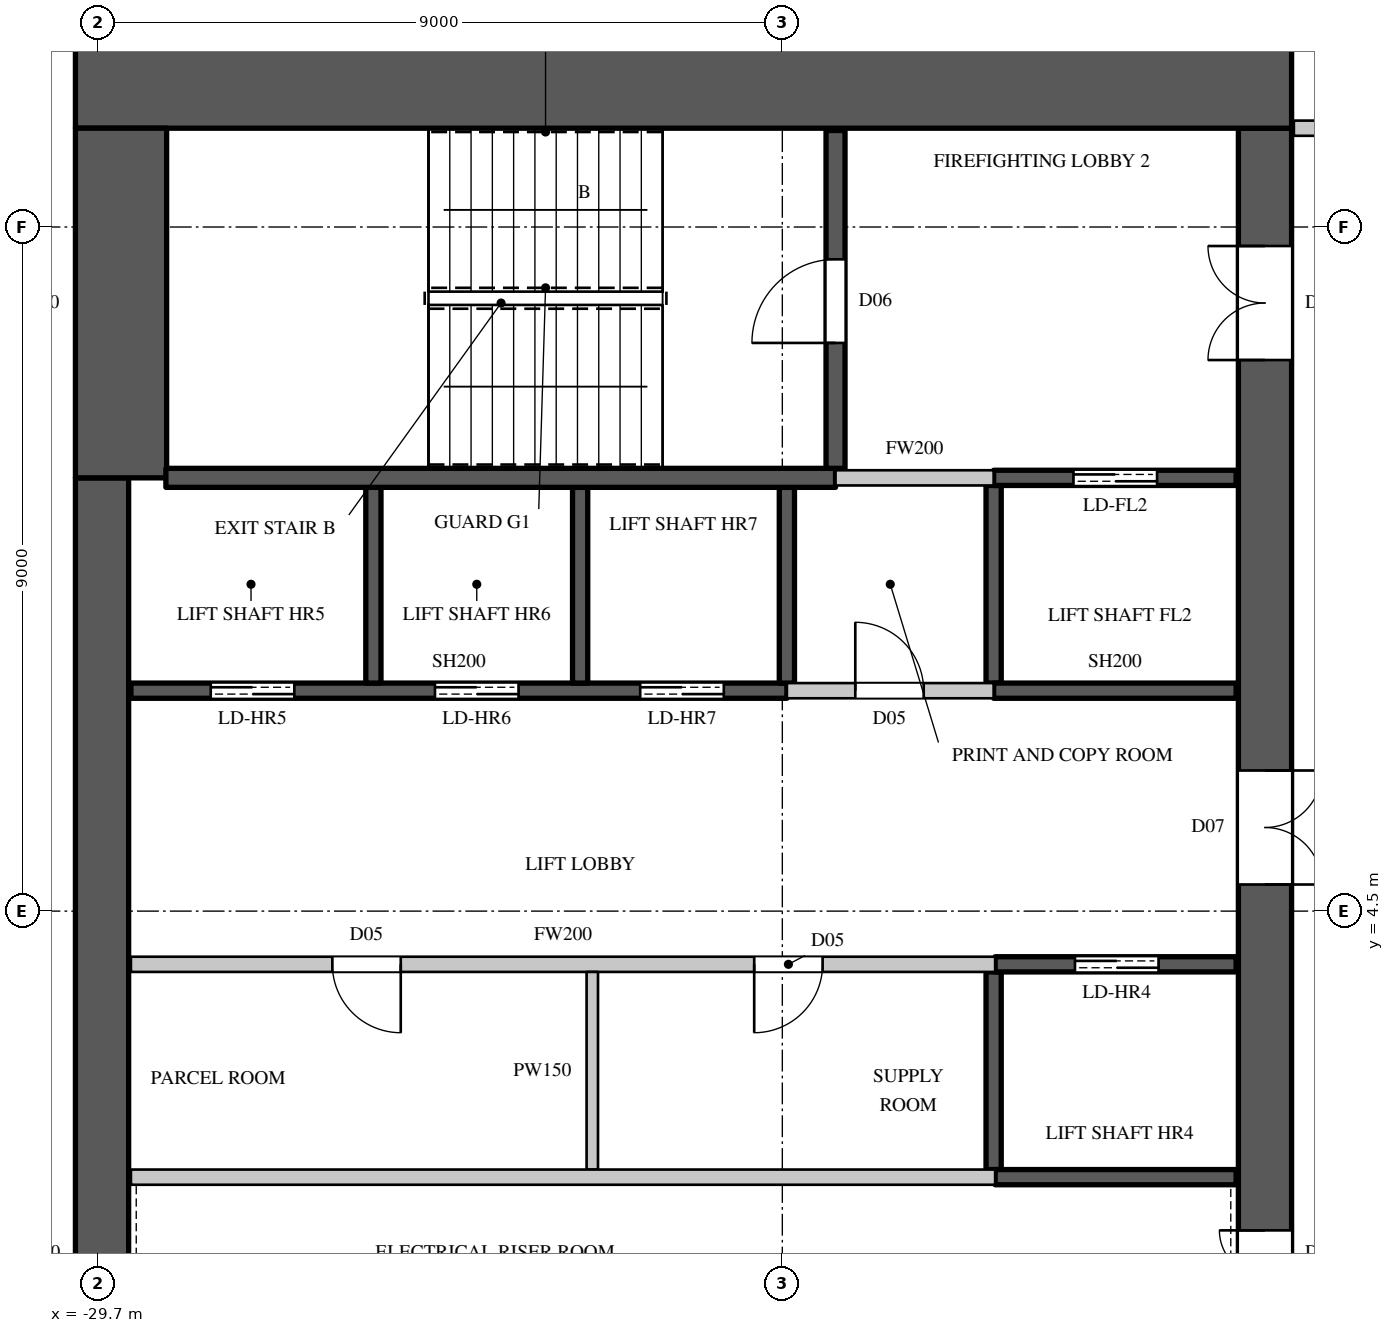
"""IFC4 building model, lengths in metres.
Left out: names, types, materials, properties, quantities, classifications, styles, units other than length and angle.
Written with IfcOpenShell. Run it as: python <this file> out.ifc"""

import sys

from ifc_helpers import new_model, si_unit, direction, frame, frame_2d, origin, place, context, subcontext, project, spatial, rectangle, extrude, element, fill, save


model = new_model("IFC4")
c1 = context("Model", 3, precision=1e-05, world=origin(), true_north=direction((0.0, 1.0)))
c2 = subcontext(c1, "Body", "Model", "MODEL_VIEW")
j1 = project(units=[si_unit("LENGTHUNIT", "METRE"), si_unit("PLANEANGLEUNIT", "RADIAN")], contexts=[c1])
p1 = place(None, origin())
s1 = spatial("IfcSite", under=j1, at=p1, CompositionType="ELEMENT")
p2 = place(p1, origin())
s2 = spatial("IfcBuilding", under=s1, at=p2, CompositionType="ELEMENT")
p3 = place(p2, frame((0.0, 0.0, 243.4)))
s3 = spatial("IfcBuildingStorey", under=s2, at=p3, CompositionType="ELEMENT", Elevation=243.4)
p4 = place(p3, frame((-30.0, 15.4, 0.0), z_axis=(0.0, 0.0, 1.0), x_axis=(1.0, 0.0, 0.0)))
e1 = element("IfcWall", 1, at=p4, inside=s3, PredefinedType="SHEAR", context=c2, shape_type="SweptSolid", body=[
    extrude(rectangle(XDim=16.0, YDim=1.2, at=frame_2d((8.0, 0.0))), origin(), (0.0, 0.0, 1.0), 4.1),
])
p5 = place(p3, frame((-14.35, -14.8, 0.0), z_axis=(0.0, 0.0, 1.0), x_axis=(0.0, 1.0, 0.0)))
e2 = element("IfcWall", 2, at=p5, inside=s3, PredefinedType="SHEAR", context=c2, shape_type="SweptSolid", body=[
    extrude(rectangle(XDim=29.6, YDim=0.7, at=frame_2d((14.8, 0.0))), origin(), (0.0, 0.0, 1.0), 4.1),
])
p6 = place(p5, frame((1.55, 0.0, 0.0)))
e3 = element("IfcOpeningElement", 3, at=p6, cuts=e2, PredefinedType="OPENING", context=c2, shape_type="SweptSolid", body=[
    extrude(rectangle(XDim=1.5, YDim=2.4, at=frame_2d((0.75, 1.2))), frame((0.0, 0.36, 0.0), z_axis=(0.0, -1.0, 0.0), x_axis=(1.0, 0.0, 0.0)), (0.0, 0.0, 1.0), 0.72),
])
p7 = place(p5, frame((26.55, 0.0, 0.0)))
e4 = element("IfcOpeningElement", 4, at=p7, cuts=e2, PredefinedType="OPENING", context=c2, shape_type="SweptSolid", body=[
    extrude(rectangle(XDim=1.5, YDim=2.4, at=frame_2d((0.75, 1.2))), frame((0.0, 0.36, 0.0), z_axis=(0.0, -1.0, 0.0), x_axis=(1.0, 0.0, 0.0)), (0.0, 0.0, 1.0), 0.72),
])
p8 = place(p5, frame((8.45, 0.0, 0.0)))
e5 = element("IfcOpeningElement", 5, at=p8, cuts=e2, PredefinedType="OPENING", context=c2, shape_type="SweptSolid", body=[
    extrude(rectangle(XDim=1.5, YDim=2.4, at=frame_2d((0.75, 1.2))), frame((0.0, 0.36, 0.0), z_axis=(0.0, -1.0, 0.0), x_axis=(1.0, 0.0, 0.0)), (0.0, 0.0, 1.0), 0.72),
])
p9 = place(p5, frame((19.65, 0.0, 0.0)))
e6 = element("IfcOpeningElement", 6, at=p9, cuts=e2, PredefinedType="OPENING", context=c2, shape_type="SweptSolid", body=[
    extrude(rectangle(XDim=1.5, YDim=2.4, at=frame_2d((0.75, 1.2))), frame((0.0, 0.36, 0.0), z_axis=(0.0, -1.0, 0.0), x_axis=(1.0, 0.0, 0.0)), (0.0, 0.0, 1.0), 0.72),
])
p10 = place(p5, frame((14.5, 0.0, 0.0)))
e7 = element("IfcOpeningElement", 7, at=p10, cuts=e2, PredefinedType="OPENING", context=c2, shape_type="SweptSolid", body=[
    extrude(rectangle(XDim=0.6, YDim=2.0, at=frame_2d((0.3, 1.0))), frame((0.0, 0.36, 0.0), z_axis=(0.0, -1.0, 0.0), x_axis=(1.0, 0.0, 0.0)), (0.0, 0.0, 1.0), 0.72),
])
p11 = place(p3, frame((-29.65, -10.2, 0.0), z_axis=(0.0, 0.0, 1.0), x_axis=(0.0, 1.0, 0.0)))
e8 = element("IfcWall", 8, at=p11, inside=s3, PredefinedType="SHEAR", context=c2, shape_type="SweptSolid", body=[
    extrude(rectangle(XDim=20.4, YDim=0.7, at=frame_2d((10.2, 0.0))), origin(), (0.0, 0.0, 1.0), 4.1),
])
p12 = place(p3, frame((-29.4, 10.2, 0.0), z_axis=(0.0, 0.0, 1.0), x_axis=(0.0, 1.0, 0.0)))
e9 = element("IfcWall", 9, at=p12, inside=s3, PredefinedType="SHEAR", context=c2, shape_type="SweptSolid", body=[
    extrude(rectangle(XDim=4.6, YDim=1.2, at=frame_2d((2.3, 0.0))), origin(), (0.0, 0.0, 1.0), 4.1),
])
p13 = place(p3, frame((-29.27, 3.8, 0.0), z_axis=(0.0, 0.0, 1.0), x_axis=(1.0, 0.0, 0.0)))
e10 = element("IfcWall", 10, at=p13, inside=s3, PredefinedType="PARTITIONING", context=c2, shape_type="SweptSolid", body=[
    extrude(rectangle(XDim=11.37, YDim=0.2, at=frame_2d((5.685, 0.0))), origin(), (0.0, 0.0, 1.0), 3.8),
])
p14 = place(p13, frame((2.65, 0.0, 0.0)))
e11 = element("IfcOpeningElement", 11, at=p14, cuts=e10, PredefinedType="OPENING", context=c2, shape_type="SweptSolid", body=[
    extrude(rectangle(XDim=0.9, YDim=2.2, at=frame_2d((0.45, 1.1))), frame((0.0, 0.11, 0.0), z_axis=(0.0, -1.0, 0.0), x_axis=(1.0, 0.0, 0.0)), (0.0, 0.0, 1.0), 0.22),
])
p15 = place(p13, frame((8.2, 0.0, 0.0)))
e12 = element("IfcOpeningElement", 12, at=p15, cuts=e10, PredefinedType="OPENING", context=c2, shape_type="SweptSolid", body=[
    extrude(rectangle(XDim=0.9, YDim=2.2, at=frame_2d((0.45, 1.1))), frame((0.0, 0.11, 0.0), z_axis=(0.0, -1.0, 0.0), x_axis=(1.0, 0.0, 0.0)), (0.0, 0.0, 1.0), 0.22),
])
p16 = place(p3, frame((-20.64, 7.4, 0.0), z_axis=(0.0, 0.0, 1.0), x_axis=(1.0, 0.0, 0.0)))
e13 = element("IfcWall", 13, at=p16, inside=s3, PredefinedType="PARTITIONING", context=c2, shape_type="SweptSolid", body=[
    extrude(rectangle(XDim=2.72, YDim=0.2, at=frame_2d((1.36, 0.0))), origin(), (0.0, 0.0, 1.0), 3.8),
])
p17 = place(p16, frame((0.9, 0.0, 0.0)))
e14 = element("IfcOpeningElement", 14, at=p17, cuts=e13, PredefinedType="OPENING", context=c2, shape_type="SweptSolid", body=[
    extrude(rectangle(XDim=0.9, YDim=2.2, at=frame_2d((0.45, 1.1))), frame((0.0, 0.11, 0.0), z_axis=(0.0, -1.0, 0.0), x_axis=(1.0, 0.0, 0.0)), (0.0, 0.0, 1.0), 0.22),
])
p18 = place(p3, frame((-20.0, 10.2, 0.0), z_axis=(0.0, 0.0, 1.0), x_axis=(1.0, 0.0, 0.0)))
e15 = element("IfcWall", 15, at=p18, inside=s3, PredefinedType="PARTITIONING", context=c2, shape_type="SweptSolid", body=[
    extrude(rectangle(XDim=2.08, YDim=0.2, at=frame_2d((1.04, 0.0))), origin(), (0.0, 0.0, 1.0), 3.8),
])
p19 = place(p3, frame((-13.97, 14.8, 0.0), z_axis=(0.0, 0.0, 1.0), x_axis=(1.0, 0.0, 0.0)))
e16 = element("IfcWall", 16, at=p19, inside=s3, PredefinedType="PARTITIONING", context=c2, shape_type="SweptSolid", body=[
    extrude(rectangle(XDim=2.87, YDim=0.2, at=frame_2d((1.435, 0.0))), origin(), (0.0, 0.0, 1.0), 3.8),
])
p20 = place(p3, frame((-23.2, 1.1, 0.0), z_axis=(0.0, 0.0, 1.0), x_axis=(0.0, 1.0, 0.0)))
e17 = element("IfcWall", 17, at=p20, inside=s3, PredefinedType="PARTITIONING", context=c2, shape_type="SweptSolid", body=[
    extrude(rectangle(XDim=2.6, YDim=0.15, at=frame_2d((1.3, 0.0))), origin(), (0.0, 0.0, 1.0), 3.8),
])
p21 = place(p3, frame((-29.27, 1.0, 0.0), z_axis=(0.0, 0.0, 1.0), x_axis=(1.0, 0.0, 0.0)))
e18 = element("IfcWall", 18, at=p21, inside=s3, PredefinedType="PARTITIONING", context=c2, shape_type="SweptSolid", body=[
    extrude(rectangle(XDim=11.37, YDim=0.2, at=frame_2d((5.685, 0.0))), origin(), (0.0, 0.0, 1.0), 3.8),
])
p22 = place(p3, frame((-29.27, 7.4, 0.0), z_axis=(0.0, 0.0, 1.0), x_axis=(1.0, 0.0, 0.0)))
e19 = element("IfcWall", 19, at=p22, inside=s3, PredefinedType="SHEAR", context=c2, shape_type="SweptSolid", body=[
    extrude(rectangle(XDim=8.63, YDim=0.2, at=frame_2d((4.315, 0.0))), origin(), (0.0, 0.0, 1.0), 3.8),
])
p23 = place(p22, frame((1.05, 0.0, 0.0)))
e20 = element("IfcOpeningElement", 20, at=p23, cuts=e19, PredefinedType="OPENING", context=c2, shape_type="SweptSolid", body=[
    extrude(rectangle(XDim=1.1, YDim=2.2, at=frame_2d((0.55, 1.1))), frame((0.0, 0.11, 0.0), z_axis=(0.0, -1.0, 0.0), x_axis=(1.0, 0.0, 0.0)), (0.0, 0.0, 1.0), 0.22),
])
p24 = place(p22, frame((4.0, 0.0, 0.0)))
e21 = element("IfcOpeningElement", 21, at=p24, cuts=e19, PredefinedType="OPENING", context=c2, shape_type="SweptSolid", body=[
    extrude(rectangle(XDim=1.1, YDim=2.2, at=frame_2d((0.55, 1.1))), frame((0.0, 0.11, 0.0), z_axis=(0.0, -1.0, 0.0), x_axis=(1.0, 0.0, 0.0)), (0.0, 0.0, 1.0), 0.22),
])
p25 = place(p22, frame((6.7, 0.0, 0.0)))
e22 = element("IfcOpeningElement", 22, at=p25, cuts=e19, PredefinedType="OPENING", context=c2, shape_type="SweptSolid", body=[
    extrude(rectangle(XDim=1.1, YDim=2.2, at=frame_2d((0.55, 1.1))), frame((0.0, 0.11, 0.0), z_axis=(0.0, -1.0, 0.0), x_axis=(1.0, 0.0, 0.0)), (0.0, 0.0, 1.0), 0.22),
])
for number, where, z_axis, x_axis in (
    (23, (-26.08, 7.5, 0.0), (0.0, 0.0, 1.0), (0.0, 1.0, 0.0)),
    (24, (-23.36, 7.5, 0.0), (0.0, 0.0, 1.0), (0.0, 1.0, 0.0)),
):
    element("IfcWall", number, at=place(p3, frame(where, z_axis=z_axis, x_axis=x_axis)), inside=s3, PredefinedType="SHEAR", context=c2, shape_type="SweptSolid", body=[
        extrude(rectangle(XDim=2.575, YDim=0.2, at=frame_2d((1.288, 0.0))), origin(), (0.0, 0.0, 1.0), 4.1),
    ])
p26 = place(p3, frame((-20.64, 7.5, 0.0), z_axis=(0.0, 0.0, 1.0), x_axis=(0.0, 1.0, 0.0)))
e25 = element("IfcWall", 25, at=p26, inside=s3, PredefinedType="SHEAR", context=c2, shape_type="SweptSolid", body=[
    extrude(rectangle(XDim=2.575, YDim=0.2, at=frame_2d((1.288, 0.0))), origin(), (0.0, 0.0, 1.0), 3.8),
])
p27 = place(p3, frame((-17.92, 1.1, 0.0), z_axis=(0.0, 0.0, 1.0), x_axis=(0.0, 1.0, 0.0)))
e26 = element("IfcWall", 26, at=p27, inside=s3, PredefinedType="SHEAR", context=c2, shape_type="SweptSolid", body=[
    extrude(rectangle(XDim=2.6, YDim=0.2, at=frame_2d((1.3, 0.0))), origin(), (0.0, 0.0, 1.0), 3.8),
])
p28 = place(p3, frame((-17.9, 1.0, 0.0), z_axis=(0.0, 0.0, 1.0), x_axis=(1.0, 0.0, 0.0)))
e27 = element("IfcWall", 27, at=p28, inside=s3, PredefinedType="SHEAR", context=c2, shape_type="SweptSolid", body=[
    extrude(rectangle(XDim=3.17, YDim=0.2, at=frame_2d((1.585, 0.0))), origin(), (0.0, 0.0, 1.0), 3.8),
])
p29 = place(p3, frame((-17.9, 3.8, 0.0), z_axis=(0.0, 0.0, 1.0), x_axis=(1.0, 0.0, 0.0)))
e28 = element("IfcWall", 28, at=p29, inside=s3, PredefinedType="SHEAR", context=c2, shape_type="SweptSolid", body=[
    extrude(rectangle(XDim=3.17, YDim=0.2, at=frame_2d((1.585, 0.0))), origin(), (0.0, 0.0, 1.0), 3.8),
])
p30 = place(p29, frame((1.05, 0.0, 0.0)))
e29 = element("IfcOpeningElement", 29, at=p30, cuts=e28, PredefinedType="OPENING", context=c2, shape_type="SweptSolid", body=[
    extrude(rectangle(XDim=1.1, YDim=2.2, at=frame_2d((0.55, 1.1))), frame((0.0, 0.11, 0.0), z_axis=(0.0, -1.0, 0.0), x_axis=(1.0, 0.0, 0.0)), (0.0, 0.0, 1.0), 0.22),
])
p31 = place(p3, frame((-17.92, 7.5, 0.0), z_axis=(0.0, 0.0, 1.0), x_axis=(0.0, 1.0, 0.0)))
e30 = element("IfcWall", 30, at=p31, inside=s3, PredefinedType="SHEAR", context=c2, shape_type="SweptSolid", body=[
    extrude(rectangle(XDim=2.6, YDim=0.2, at=frame_2d((1.3, 0.0))), origin(), (0.0, 0.0, 1.0), 3.8),
])
p32 = place(p3, frame((-17.92, 7.4, 0.0), z_axis=(0.0, 0.0, 1.0), x_axis=(1.0, 0.0, 0.0)))
e31 = element("IfcWall", 31, at=p32, inside=s3, PredefinedType="SHEAR", context=c2, shape_type="SweptSolid", body=[
    extrude(rectangle(XDim=3.19, YDim=0.2, at=frame_2d((1.595, 0.0))), origin(), (0.0, 0.0, 1.0), 3.8),
])
p33 = place(p3, frame((-17.92, 10.2, 0.0), z_axis=(0.0, 0.0, 1.0), x_axis=(1.0, 0.0, 0.0)))
e32 = element("IfcWall", 32, at=p33, inside=s3, PredefinedType="SHEAR", context=c2, shape_type="SweptSolid", body=[
    extrude(rectangle(XDim=3.19, YDim=0.2, at=frame_2d((1.595, 0.0))), origin(), (0.0, 0.0, 1.0), 3.8),
])
p34 = place(p33, frame((1.05, 0.0, 0.0)))
e33 = element("IfcOpeningElement", 33, at=p34, cuts=e32, PredefinedType="OPENING", context=c2, shape_type="SweptSolid", body=[
    extrude(rectangle(XDim=1.1, YDim=2.2, at=frame_2d((0.55, 1.1))), frame((0.0, 0.11, 0.0), z_axis=(0.0, -1.0, 0.0), x_axis=(1.0, 0.0, 0.0)), (0.0, 0.0, 1.0), 0.22),
])
p35 = place(p3, frame((-28.81, 10.2, 0.0), z_axis=(0.0, 0.0, 1.0), x_axis=(1.0, 0.0, 0.0)))
e34 = element("IfcWall", 34, at=p35, inside=s3, PredefinedType="SHEAR", context=c2, shape_type="SweptSolid", body=[
    extrude(rectangle(XDim=8.81, YDim=0.25, at=frame_2d((4.405, 0.0))), origin(), (0.0, 0.0, 1.0), 3.8),
])
p36 = place(p3, frame((-20.0, 10.325, 0.0), z_axis=(0.0, 0.0, 1.0), x_axis=(0.0, 1.0, 0.0)))
e35 = element("IfcWall", 35, at=p36, inside=s3, PredefinedType="SHEAR", context=c2, shape_type="SweptSolid", body=[
    extrude(rectangle(XDim=4.445, YDim=0.25, at=frame_2d((2.223, 0.0))), origin(), (0.0, 0.0, 1.0), 3.8),
])
p37 = place(p36, frame((1.65, 0.0, 0.0)))
e36 = element("IfcOpeningElement", 36, at=p37, cuts=e35, PredefinedType="OPENING", context=c2, shape_type="SweptSolid", body=[
    extrude(rectangle(XDim=1.1, YDim=2.2, at=frame_2d((0.55, 1.1))), frame((0.0, 0.135, 0.0), z_axis=(0.0, -1.0, 0.0), x_axis=(1.0, 0.0, 0.0)), (0.0, 0.0, 1.0), 0.27),
])
p38 = place(p37, origin())
e37 = element("IfcDoor", 37, at=p38, inside=s3, OperationType="SINGLE_SWING_LEFT", PredefinedType="DOOR", context=c2, shape_type="SweptSolid", body=[
    extrude(rectangle(XDim=1.1, YDim=2.2, at=frame_2d((0.55, 1.1))), frame((0.0, 0.025, 0.0), z_axis=(0.0, -1.0, 0.0), x_axis=(1.0, 0.0, 0.0)), (0.0, 0.0, 1.0), 0.05),
])
fill(e36, e37)
p39 = place(p14, origin())
e38 = element("IfcDoor", 38, at=p39, inside=s3, OperationType="SINGLE_SWING_LEFT", PredefinedType="DOOR", context=c2, shape_type="SweptSolid", body=[
    extrude(rectangle(XDim=0.9, YDim=2.2, at=frame_2d((0.45, 1.1))), frame((0.0, 0.025, 0.0), z_axis=(0.0, -1.0, 0.0), x_axis=(1.0, 0.0, 0.0)), (0.0, 0.0, 1.0), 0.05),
])
fill(e11, e38)
p40 = place(p15, origin())
e39 = element("IfcDoor", 39, at=p40, inside=s3, OperationType="SINGLE_SWING_RIGHT", PredefinedType="DOOR", context=c2, shape_type="SweptSolid", body=[
    extrude(rectangle(XDim=0.9, YDim=2.2, at=frame_2d((0.45, 1.1))), frame((0.0, 0.025, 0.0), z_axis=(0.0, -1.0, 0.0), x_axis=(1.0, 0.0, 0.0)), (0.0, 0.0, 1.0), 0.05),
])
fill(e12, e39)
p41 = place(p17, origin())
e40 = element("IfcDoor", 40, at=p41, inside=s3, OperationType="SINGLE_SWING_LEFT", PredefinedType="DOOR", context=c2, shape_type="SweptSolid", body=[
    extrude(rectangle(XDim=0.9, YDim=2.2, at=frame_2d((0.45, 1.1))), frame((0.0, 0.025, 0.0), z_axis=(0.0, -1.0, 0.0), x_axis=(1.0, 0.0, 0.0)), (0.0, 0.0, 1.0), 0.05),
])
fill(e14, e40)
p42 = place(p30, origin())
e41 = element("IfcDoor", 41, at=p42, inside=s3, OperationType="DOUBLE_DOOR_SLIDING", PredefinedType="DOOR", context=c2, shape_type="SweptSolid", body=[
    extrude(rectangle(XDim=1.1, YDim=2.2, at=frame_2d((0.55, 1.1))), frame((0.0, 0.025, 0.0), z_axis=(0.0, -1.0, 0.0), x_axis=(1.0, 0.0, 0.0)), (0.0, 0.0, 1.0), 0.05),
])
fill(e29, e41)
p43 = place(p23, origin())
e42 = element("IfcDoor", 42, at=p43, inside=s3, OperationType="DOUBLE_DOOR_SLIDING", PredefinedType="DOOR", context=c2, shape_type="SweptSolid", body=[
    extrude(rectangle(XDim=1.1, YDim=2.2, at=frame_2d((0.55, 1.1))), frame((0.0, 0.025, 0.0), z_axis=(0.0, -1.0, 0.0), x_axis=(1.0, 0.0, 0.0)), (0.0, 0.0, 1.0), 0.05),
])
fill(e20, e42)
p44 = place(p24, origin())
e43 = element("IfcDoor", 43, at=p44, inside=s3, OperationType="DOUBLE_DOOR_SLIDING", PredefinedType="DOOR", context=c2, shape_type="SweptSolid", body=[
    extrude(rectangle(XDim=1.1, YDim=2.2, at=frame_2d((0.55, 1.1))), frame((0.0, 0.025, 0.0), z_axis=(0.0, -1.0, 0.0), x_axis=(1.0, 0.0, 0.0)), (0.0, 0.0, 1.0), 0.05),
])
fill(e21, e43)
p45 = place(p25, origin())
e44 = element("IfcDoor", 44, at=p45, inside=s3, OperationType="DOUBLE_DOOR_SLIDING", PredefinedType="DOOR", context=c2, shape_type="SweptSolid", body=[
    extrude(rectangle(XDim=1.1, YDim=2.2, at=frame_2d((0.55, 1.1))), frame((0.0, 0.025, 0.0), z_axis=(0.0, -1.0, 0.0), x_axis=(1.0, 0.0, 0.0)), (0.0, 0.0, 1.0), 0.05),
])
fill(e22, e44)
p46 = place(p34, origin())
e45 = element("IfcDoor", 45, at=p46, inside=s3, OperationType="DOUBLE_DOOR_SLIDING", PredefinedType="DOOR", context=c2, shape_type="SweptSolid", body=[
    extrude(rectangle(XDim=1.1, YDim=2.2, at=frame_2d((0.55, 1.1))), frame((0.0, 0.025, 0.0), z_axis=(0.0, -1.0, 0.0), x_axis=(1.0, 0.0, 0.0)), (0.0, 0.0, 1.0), 0.05),
])
fill(e33, e45)
p47 = place(p7, origin())
e46 = element("IfcDoor", 46, at=p47, inside=s3, OperationType="DOUBLE_DOOR_SINGLE_SWING", PredefinedType="DOOR", context=c2, shape_type="SweptSolid", body=[
    extrude(rectangle(XDim=1.5, YDim=2.4, at=frame_2d((0.75, 1.2))), frame((0.0, 0.345, 0.0), z_axis=(0.0, -1.0, 0.0), x_axis=(1.0, 0.0, 0.0)), (0.0, 0.0, 1.0), 0.05),
])
fill(e4, e46)
p48 = place(p9, origin())
e47 = element("IfcDoor", 47, at=p48, inside=s3, OperationType="DOUBLE_DOOR_SINGLE_SWING", PredefinedType="DOOR", context=c2, shape_type="SweptSolid", body=[
    extrude(rectangle(XDim=1.5, YDim=2.4, at=frame_2d((0.75, 1.2))), frame((0.0, -0.295, 0.0), z_axis=(0.0, -1.0, 0.0), x_axis=(1.0, 0.0, 0.0)), (0.0, 0.0, 1.0), 0.05),
])
fill(e6, e47)
p49 = place(p10, origin())
e48 = element("IfcDoor", 48, at=p49, inside=s3, OperationType="SINGLE_SWING_RIGHT", PredefinedType="DOOR", context=c2, shape_type="SweptSolid", body=[
    extrude(rectangle(XDim=0.6, YDim=2.0, at=frame_2d((0.3, 1.0))), frame((0.0, 0.345, 0.0), z_axis=(0.0, -1.0, 0.0), x_axis=(1.0, 0.0, 0.0)), (0.0, 0.0, 1.0), 0.05),
])
fill(e7, e48)
save(model, sys.argv[1])
